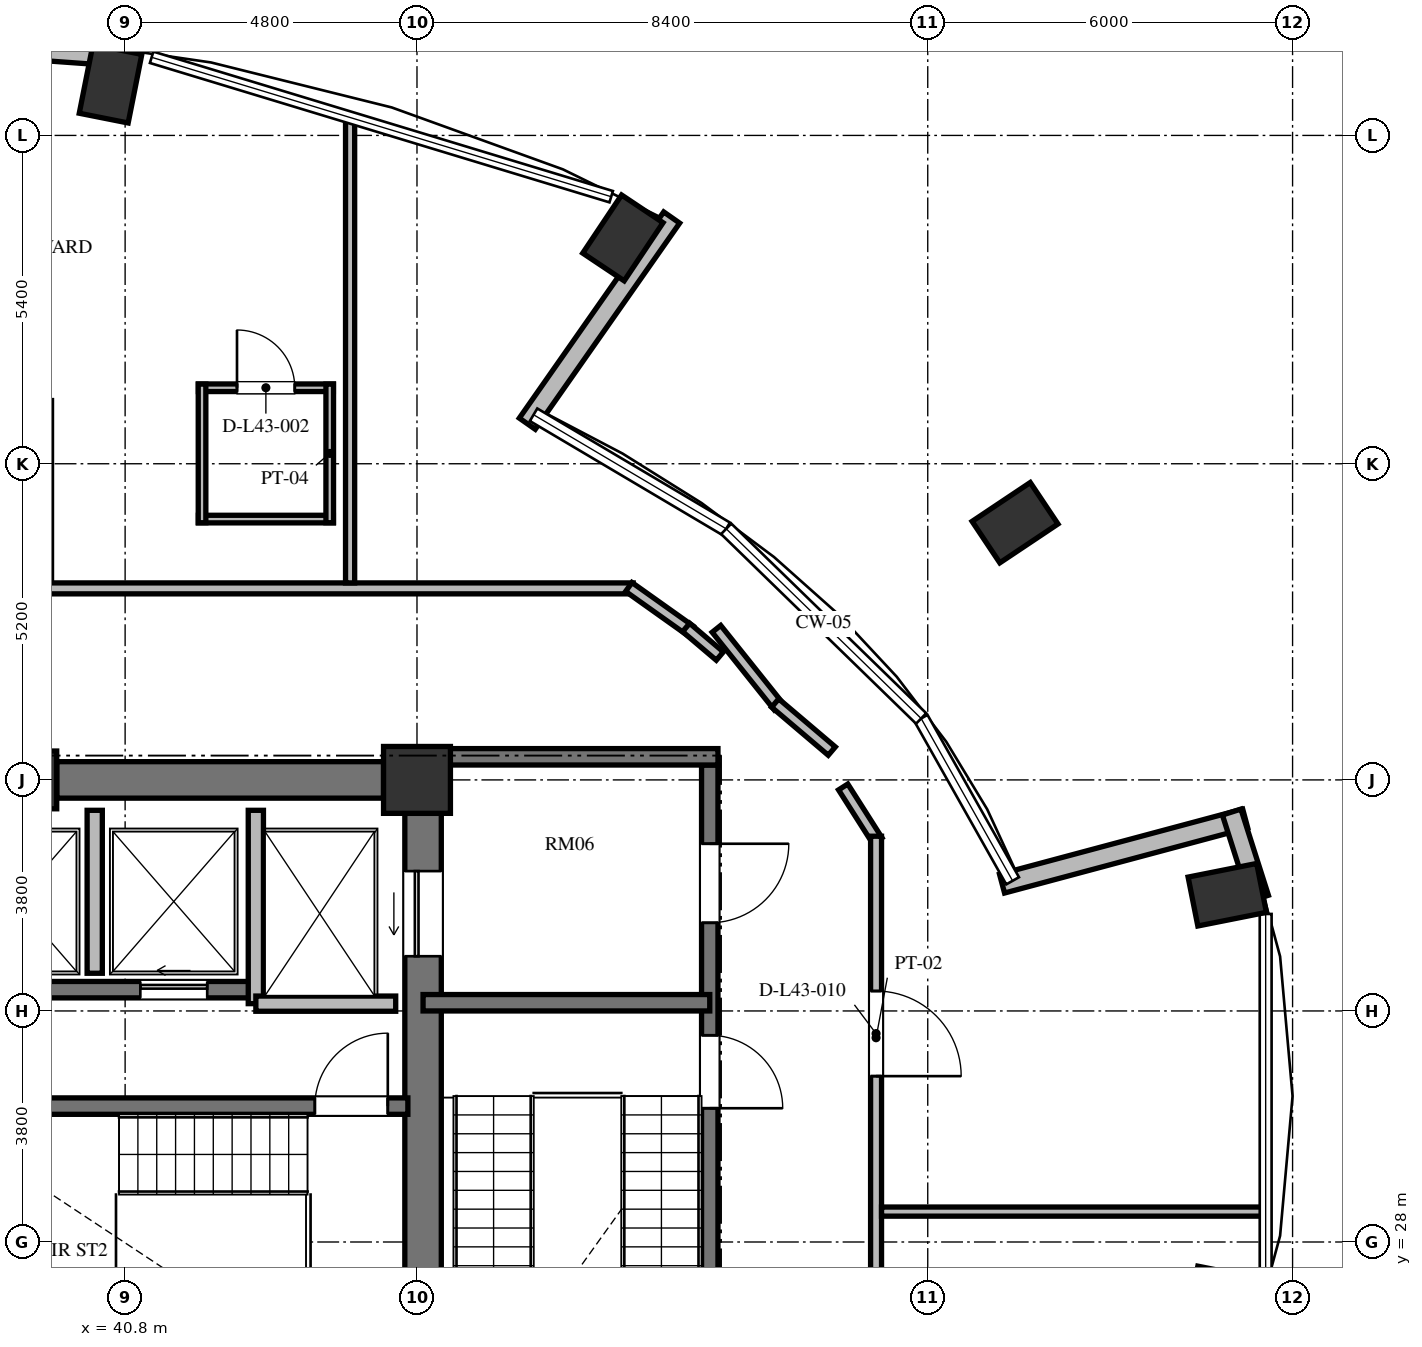
"""IFC4 building model, lengths in metres.
Left out: names, types, materials, properties, quantities, classifications, styles, units other than length and angle.
Written with IfcOpenShell. Run it as: python <this file> out.ifc"""

import sys

from ifc_helpers import new_model, si_unit, direction, frame, frame_2d, origin, origin_2d, place, context, subcontext, project, spatial, rectangle, extrude, element, fill, save


model = new_model("IFC4")
c1 = context("Model", 3, precision=1e-05, world=origin(), true_north=direction((0.0, 1.0)))
c2 = subcontext(c1, "Body", "Model", "MODEL_VIEW")
j1 = project(units=[si_unit("LENGTHUNIT", "METRE"), si_unit("PLANEANGLEUNIT", "RADIAN")], contexts=[c1])
p1 = place(None, origin())
s1 = spatial("IfcSite", under=j1, at=p1, CompositionType="ELEMENT")
p2 = place(p1, origin())
s2 = spatial("IfcBuilding", under=s1, at=p2, CompositionType="ELEMENT")
p3 = place(p2, frame((0.0, 0.0, 167.472)))
s3 = spatial("IfcBuildingStorey", under=s2, at=p3, CompositionType="ELEMENT", Elevation=167.472)
for number, where, z_axis, x_axis in (
    (1, (58.926, 27.088, 0.0), (0.0, 0.0, 1.0), (0.981, -0.195, 0.0)),
    (2, (58.926, 33.712, 0.0), (0.0, 0.0, 1.0), (0.981, 0.195, 0.0)),
    (3, (55.436, 39.831, 0.0), (0.0, 0.0, 1.0), (0.831, 0.556, 0.0)),
    (4, (48.987, 44.514, 0.0), (0.0, 0.0, 1.0), (0.556, 0.831, 0.0)),
    (5, (40.56, 47.049, 0.0), (0.0, 0.0, 1.0), (0.195, 0.981, 0.0)),
):
    element("IfcColumn", number, at=place(p3, frame(where, z_axis=z_axis, x_axis=x_axis)), inside=s3, PredefinedType="COLUMN", context=c2, shape_type="SweptSolid", body=[
        extrude(rectangle(XDim=1.15, YDim=0.82, at=origin_2d()), origin(), (0.0, 0.0, 1.0), 3.648),
    ])
p4 = place(p3, frame((45.6, 35.6, 0.0), z_axis=(0.0, 0.0, 1.0), x_axis=(1.0, 0.0, 0.0)))
e6 = element("IfcColumn", 6, at=p4, inside=s3, PredefinedType="COLUMN", context=c2, shape_type="SweptSolid", body=[
    extrude(rectangle(XDim=1.1, YDim=1.1, at=origin_2d()), origin(), (0.0, 0.0, 1.0), 3.648),
])
p5 = place(p3, frame((39.2, 35.6, 0.0), z_axis=(0.0, 0.0, 1.0), x_axis=(1.0, 0.0, 0.0)))
e7 = element("IfcColumn", 7, at=p5, inside=s3, PredefinedType="COLUMN", context=c2, shape_type="SweptSolid", body=[
    extrude(rectangle(XDim=0.95, YDim=0.95, at=origin_2d()), origin(), (0.0, 0.0, 1.0), 3.648),
])
p6 = place(p3, frame((45.7, 20.95, 0.0), z_axis=(0.0, 0.0, 1.0), x_axis=(0.0, 1.0, 0.0)))
e8 = element("IfcWall", 8, at=p6, inside=s3, PredefinedType="SHEAR", context=c2, shape_type="SweptSolid", body=[
    extrude(rectangle(XDim=14.1, YDim=0.6, at=frame_2d((7.05, 0.0))), origin(), (0.0, 0.0, 1.0), 3.648),
])
p7 = place(p6, frame((11.75, 0.0, 0.0)))
e9 = element("IfcOpeningElement", 9, at=p7, cuts=e8, PredefinedType="OPENING", context=c2, shape_type="SweptSolid", body=[
    extrude(rectangle(XDim=1.4, YDim=2.3, at=frame_2d((0.7, 1.15))), frame((0.0, 0.31, 0.0), z_axis=(0.0, -1.0, 0.0), x_axis=(1.0, 0.0, 0.0)), (0.0, 0.0, 1.0), 0.62),
])
p8 = place(p6, frame((0.95, 0.0, 0.0)))
e10 = element("IfcOpeningElement", 10, at=p8, cuts=e8, PredefinedType="OPENING", context=c2, shape_type="SweptSolid", body=[
    extrude(rectangle(XDim=1.4, YDim=2.3, at=frame_2d((0.7, 1.15))), frame((0.0, 0.31, 0.0), z_axis=(0.0, -1.0, 0.0), x_axis=(1.0, 0.0, 0.0)), (0.0, 0.0, 1.0), 0.62),
])
p9 = place(p3, frame((39.675, 35.6, 0.0), z_axis=(0.0, 0.0, 1.0), x_axis=(1.0, 0.0, 0.0)))
e11 = element("IfcWall", 11, at=p9, inside=s3, PredefinedType="SHEAR", context=c2, shape_type="SweptSolid", body=[
    extrude(rectangle(XDim=5.375, YDim=0.6, at=frame_2d((2.688, 0.0))), origin(), (0.0, 0.0, 1.0), 3.648),
])
p10 = place(p3, frame((40.701, 47.501, 0.0), z_axis=(0.0, 0.0, 1.0), x_axis=(-0.997415460462, 0.071849838072, 0.0)))
e12 = element("IfcWall", 12, at=p10, inside=s3, PredefinedType="SOLIDWALL", context=c2, shape_type="SweptSolid", body=[
    extrude(rectangle(XDim=4.893, YDim=0.32, at=frame_2d((2.447, 0.0))), origin(), (0.0, 0.0, 1.0), 3.428),
])
p11 = place(p10, frame((1.846, 0.0, 0.85)))
e13 = element("IfcOpeningElement", 13, at=p11, cuts=e12, PredefinedType="OPENING", context=c2, shape_type="SweptSolid", body=[
    extrude(rectangle(XDim=1.2, YDim=2.2, at=frame_2d((0.6, 1.1))), frame((0.0, 0.17, 0.0), z_axis=(0.0, -1.0, 0.0), x_axis=(1.0, 0.0, 0.0)), (0.0, 0.0, 1.0), 0.34),
])
p12 = place(p3, frame((59.221, 34.966, 0.0), z_axis=(0.0, 0.0, 1.0), x_axis=(-0.965925940868, -0.258818617489, 0.0)))
e14 = element("IfcWall", 14, at=p12, inside=s3, PredefinedType="SOLIDWALL", context=c2, shape_type="SweptSolid", body=[
    extrude(rectangle(XDim=4.14, YDim=0.32, at=frame_2d((2.07, 0.0))), origin(), (0.0, 0.0, 1.0), 3.428),
])
p13 = place(p3, frame((49.789, 44.85, 0.0), z_axis=(0.0, 0.0, 1.0), x_axis=(-0.57355337011, -0.819168194961, 0.0)))
e15 = element("IfcWall", 15, at=p13, inside=s3, PredefinedType="SOLIDWALL", context=c2, shape_type="SweptSolid", body=[
    extrude(rectangle(XDim=4.14, YDim=0.32, at=frame_2d((2.07, 0.0))), origin(), (0.0, 0.0, 1.0), 3.428),
])
p14 = place(p3, frame((59.45, 33.654, 0.0), z_axis=(0.0, 0.0, 1.0), x_axis=(-0.303745470451, 0.952753215256, 0.0)))
e16 = element("IfcWall", 16, at=p14, inside=s3, PredefinedType="SOLIDWALL", context=c2, shape_type="SweptSolid", body=[
    extrude(rectangle(XDim=1.488, YDim=0.32, at=frame_2d((0.744, 0.0))), origin(), (0.0, 0.0, 1.0), 3.428),
])
p15 = place(p3, frame((37.465, 30.235, 0.0), z_axis=(0.0, 0.0, 1.0), x_axis=(1.0, 0.0, 0.0)))
e17 = element("IfcWall", 17, at=p15, inside=s3, PredefinedType="SHEAR", context=c2, shape_type="SweptSolid", body=[
    extrude(rectangle(XDim=7.985, YDim=0.27, at=frame_2d((3.992, 0.0))), origin(), (0.0, 0.0, 1.0), 3.648),
])
p16 = place(p15, frame((6.455, 0.0, 0.0)))
e18 = element("IfcOpeningElement", 18, at=p16, cuts=e17, PredefinedType="OPENING", context=c2, shape_type="SweptSolid", body=[
    extrude(rectangle(XDim=1.2, YDim=2.15, at=frame_2d((0.6, 1.075))), frame((0.0, 0.145, 0.0), z_axis=(0.0, -1.0, 0.0), x_axis=(1.0, 0.0, 0.0)), (0.0, 0.0, 1.0), 0.29),
])
p17 = place(p3, frame((26.55, 32.15, 0.0), z_axis=(0.0, 0.0, 1.0), x_axis=(1.0, 0.0, 0.0)))
e19 = element("IfcWall", 19, at=p17, inside=s3, PredefinedType="SHEAR", context=c2, shape_type="SweptSolid", body=[
    extrude(rectangle(XDim=16.4, YDim=0.27, at=frame_2d((8.2, 0.0))), origin(), (0.0, 0.0, 1.0), 3.648),
])
p18 = place(p17, frame((2.425, 0.0, 0.0)))
e20 = element("IfcOpeningElement", 20, at=p18, cuts=e19, PredefinedType="OPENING", context=c2, shape_type="SweptSolid", body=[
    extrude(rectangle(XDim=1.05, YDim=2.15, at=frame_2d((0.525, 1.075))), frame((0.0, 0.145, 0.0), z_axis=(0.0, -1.0, 0.0), x_axis=(1.0, 0.0, 0.0)), (0.0, 0.0, 1.0), 0.29),
])
p19 = place(p17, frame((6.5, 0.0, 0.0)))
e21 = element("IfcOpeningElement", 21, at=p19, cuts=e19, PredefinedType="OPENING", context=c2, shape_type="SweptSolid", body=[
    extrude(rectangle(XDim=1.1, YDim=2.2, at=frame_2d((0.55, 1.1))), frame((0.0, 0.145, 0.0), z_axis=(0.0, -1.0, 0.0), x_axis=(1.0, 0.0, 0.0)), (0.0, 0.0, 1.0), 0.29),
])
p20 = place(p17, frame((9.1, 0.0, 0.0)))
e22 = element("IfcOpeningElement", 22, at=p20, cuts=e19, PredefinedType="OPENING", context=c2, shape_type="SweptSolid", body=[
    extrude(rectangle(XDim=1.1, YDim=2.2, at=frame_2d((0.55, 1.1))), frame((0.0, 0.145, 0.0), z_axis=(0.0, -1.0, 0.0), x_axis=(1.0, 0.0, 0.0)), (0.0, 0.0, 1.0), 0.29),
])
p21 = place(p17, frame((11.9, 0.0, 0.0)))
e23 = element("IfcOpeningElement", 23, at=p21, cuts=e19, PredefinedType="OPENING", context=c2, shape_type="SweptSolid", body=[
    extrude(rectangle(XDim=1.1, YDim=2.2, at=frame_2d((0.55, 1.1))), frame((0.0, 0.145, 0.0), z_axis=(0.0, -1.0, 0.0), x_axis=(1.0, 0.0, 0.0)), (0.0, 0.0, 1.0), 0.29),
])
p22 = place(p17, frame((14.5, 0.0, 0.0)))
e24 = element("IfcOpeningElement", 24, at=p22, cuts=e19, PredefinedType="OPENING", context=c2, shape_type="SweptSolid", body=[
    extrude(rectangle(XDim=1.1, YDim=2.2, at=frame_2d((0.55, 1.1))), frame((0.0, 0.145, 0.0), z_axis=(0.0, -1.0, 0.0), x_axis=(1.0, 0.0, 0.0)), (0.0, 0.0, 1.0), 0.29),
])
p23 = place(p3, frame((42.95, 31.92, 0.0), z_axis=(0.0, 0.0, 1.0), x_axis=(0.0, 1.0, 0.0)))
e25 = element("IfcWall", 25, at=p23, inside=s3, PredefinedType="SOLIDWALL", context=c2, shape_type="SweptSolid", body=[
    extrude(rectangle(XDim=3.18, YDim=0.25, at=frame_2d((1.59, 0.0))), origin(), (0.0, 0.0, 1.0), 3.428),
])
p24 = place(p3, frame((42.95, 31.92, 0.0), z_axis=(0.0, 0.0, 1.0), x_axis=(1.0, 0.0, 0.0)))
e26 = element("IfcWall", 26, at=p24, inside=s3, PredefinedType="SOLIDWALL", context=c2, shape_type="SweptSolid", body=[
    extrude(rectangle(XDim=2.3, YDim=0.25, at=frame_2d((1.15, 0.0))), origin(), (0.0, 0.0, 1.0), 3.428),
])
p25 = place(p3, frame((40.3, 32.42, 0.0), z_axis=(0.0, 0.0, 1.0), x_axis=(0.0, 1.0, 0.0)))
e27 = element("IfcWall", 27, at=p25, inside=s3, PredefinedType="SOLIDWALL", context=c2, shape_type="SweptSolid", body=[
    extrude(rectangle(XDim=2.68, YDim=0.25, at=frame_2d((1.34, 0.0))), origin(), (0.0, 0.0, 1.0), 3.428),
])
p26 = place(p3, frame((50.415, 35.845, 0.0), z_axis=(0.0, 0.0, 1.0), x_axis=(0.0, -1.0, 0.0)))
e28 = element("IfcWall", 28, at=p26, inside=s3, PredefinedType="SHEAR", context=c2, shape_type="SweptSolid", body=[
    extrude(rectangle(XDim=15.825, YDim=0.27, at=frame_2d((7.913, 0.0))), origin(), (0.0, 0.0, 1.0), 3.648),
])
p27 = place(p26, frame((4.445, 0.0, 0.0)))
e29 = element("IfcOpeningElement", 29, at=p27, cuts=e28, PredefinedType="OPENING", context=c2, shape_type="SweptSolid", body=[
    extrude(rectangle(XDim=1.2, YDim=2.15, at=frame_2d((0.6, 1.075))), frame((0.0, 0.145, 0.0), z_axis=(0.0, -1.0, 0.0), x_axis=(1.0, 0.0, 0.0)), (0.0, 0.0, 1.0), 0.29),
])
p28 = place(p26, frame((1.295, 0.0, 0.0)))
e30 = element("IfcOpeningElement", 30, at=p28, cuts=e28, PredefinedType="OPENING", context=c2, shape_type="SweptSolid", body=[
    extrude(rectangle(XDim=1.3, YDim=2.2, at=frame_2d((0.65, 1.1))), frame((0.0, 0.145, 0.0), z_axis=(0.0, -1.0, 0.0), x_axis=(1.0, 0.0, 0.0)), (0.0, 0.0, 1.0), 0.29),
])
p29 = place(p26, frame((13.095, 0.0, 0.0)))
e31 = element("IfcOpeningElement", 31, at=p29, cuts=e28, PredefinedType="OPENING", context=c2, shape_type="SweptSolid", body=[
    extrude(rectangle(XDim=1.3, YDim=2.2, at=frame_2d((0.65, 1.1))), frame((0.0, 0.145, 0.0), z_axis=(0.0, -1.0, 0.0), x_axis=(1.0, 0.0, 0.0)), (0.0, 0.0, 1.0), 0.29),
])
p30 = place(p3, frame((46.0, 35.98, 0.0), z_axis=(0.0, 0.0, 1.0), x_axis=(1.0, 0.0, 0.0)))
e32 = element("IfcWall", 32, at=p30, inside=s3, PredefinedType="SHEAR", context=c2, shape_type="SweptSolid", body=[
    extrude(rectangle(XDim=4.55, YDim=0.27, at=frame_2d((2.275, 0.0))), origin(), (0.0, 0.0, 1.0), 3.648),
])
p31 = place(p3, frame((45.7, 31.935, 0.0), z_axis=(0.0, 0.0, 1.0), x_axis=(1.0, 0.0, 0.0)))
e33 = element("IfcWall", 33, at=p31, inside=s3, PredefinedType="SHEAR", context=c2, shape_type="SweptSolid", body=[
    extrude(rectangle(XDim=4.715, YDim=0.27, at=frame_2d((2.357, 0.0))), origin(), (0.0, 0.0, 1.0), 3.648),
])
p32 = place(p3, frame((39.46, 38.75, 0.0), z_axis=(0.0, 0.0, 1.0), x_axis=(1.0, 0.0, 0.0)))
e34 = element("IfcWall", 34, at=p32, inside=s3, PredefinedType="PARTITIONING", context=c2, shape_type="SweptSolid", body=[
    extrude(rectangle(XDim=9.696, YDim=0.18, at=frame_2d((4.848, 0.0))), origin(), (0.0, 0.0, 1.0), 3.428),
])
p33 = place(p3, frame((49.083, 38.773, 0.0), z_axis=(0.0, 0.0, 1.0), x_axis=(0.815094383649, -0.579328184835, 0.0)))
e35 = element("IfcWall", 35, at=p33, inside=s3, PredefinedType="PARTITIONING", context=c2, shape_type="SweptSolid", body=[
    extrude(rectangle(XDim=1.234, YDim=0.18, at=frame_2d((0.617, 0.0))), origin(), (0.0, 0.0, 1.0), 3.428),
])
p34 = place(p3, frame((50.026, 38.107, 0.0), z_axis=(0.0, 0.0, 1.0), x_axis=(0.762519178552, -0.646965611405, 0.0)))
e36 = element("IfcWall", 36, at=p34, inside=s3, PredefinedType="PARTITIONING", context=c2, shape_type="SweptSolid", body=[
    extrude(rectangle(XDim=0.727, YDim=0.18, at=frame_2d((0.363, 0.0))), origin(), (0.0, 0.0, 1.0), 3.428),
])
p35 = place(p3, frame((50.525, 38.085, 0.0), z_axis=(0.0, 0.0, 1.0), x_axis=(0.624367263629, -0.781130923794, 0.0)))
e37 = element("IfcWall", 37, at=p35, inside=s3, PredefinedType="PARTITIONING", context=c2, shape_type="SweptSolid", body=[
    extrude(rectangle(XDim=1.635, YDim=0.18, at=frame_2d((0.818, 0.0))), origin(), (0.0, 0.0, 1.0), 3.428),
])
p36 = place(p3, frame((51.49, 36.865, 0.0), z_axis=(0.0, 0.0, 1.0), x_axis=(0.762506147444, -0.646980969666, 0.0)))
e38 = element("IfcWall", 38, at=p36, inside=s3, PredefinedType="PARTITIONING", context=c2, shape_type="SweptSolid", body=[
    extrude(rectangle(XDim=1.221, YDim=0.18, at=frame_2d((0.611, 0.0))), origin(), (0.0, 0.0, 1.0), 3.428),
])
p37 = place(p3, frame((52.609, 35.484, 0.0), z_axis=(0.0, 0.0, 1.0), x_axis=(0.536664379082, -0.843795795335, 0.0)))
e39 = element("IfcWall", 39, at=p37, inside=s3, PredefinedType="PARTITIONING", context=c2, shape_type="SweptSolid", body=[
    extrude(rectangle(XDim=1.048, YDim=0.18, at=frame_2d((0.524, 0.0))), origin(), (0.0, 0.0, 1.0), 3.428),
])
p38 = place(p3, frame((53.15, 34.674, 0.0), z_axis=(0.0, 0.0, 1.0), x_axis=(0.0, -1.0, 0.0)))
e40 = element("IfcWall", 40, at=p38, inside=s3, PredefinedType="PARTITIONING", context=c2, shape_type="SweptSolid", body=[
    extrude(rectangle(XDim=13.258, YDim=0.18, at=frame_2d((6.629, 0.0))), origin(), (0.0, 0.0, 1.0), 3.428),
])
p39 = place(p38, frame((8.857, 0.0, 0.0)))
e41 = element("IfcOpeningElement", 41, at=p39, cuts=e40, PredefinedType="OPENING", context=c2, shape_type="SweptSolid", body=[
    extrude(rectangle(XDim=1.4, YDim=2.2, at=frame_2d((0.7, 1.1))), frame((0.0, 0.1, 0.0), z_axis=(0.0, -1.0, 0.0), x_axis=(1.0, 0.0, 0.0)), (0.0, 0.0, 1.0), 0.2),
])
p40 = place(p38, frame((2.546, 0.0, 0.0)))
e42 = element("IfcOpeningElement", 42, at=p40, cuts=e40, PredefinedType="OPENING", context=c2, shape_type="SweptSolid", body=[
    extrude(rectangle(XDim=1.4, YDim=2.2, at=frame_2d((0.7, 1.1))), frame((0.0, 0.1, 0.0), z_axis=(0.0, -1.0, 0.0), x_axis=(1.0, 0.0, 0.0)), (0.0, 0.0, 1.0), 0.2),
])
p41 = place(p3, frame((53.24, 28.5, 0.0), z_axis=(0.0, 0.0, 1.0), x_axis=(1.0, 0.0, 0.0)))
e43 = element("IfcWall", 43, at=p41, inside=s3, PredefinedType="PARTITIONING", context=c2, shape_type="SweptSolid", body=[
    extrude(rectangle(XDim=6.307, YDim=0.15, at=frame_2d((3.154, 0.0))), origin(), (0.0, 0.0, 1.0), 3.428),
])
p42 = place(p3, frame((44.5, 38.84, 0.0), z_axis=(0.0, 0.0, 1.0), x_axis=(0.0, 1.0, 0.0)))
e44 = element("IfcWall", 44, at=p42, inside=s3, PredefinedType="PARTITIONING", context=c2, shape_type="SweptSolid", body=[
    extrude(rectangle(XDim=7.639, YDim=0.15, at=frame_2d((3.82, 0.0))), origin(), (0.0, 0.0, 1.0), 3.428),
])
p43 = place(p3, frame((42.005, 42.05, 0.0), z_axis=(0.0, 0.0, 1.0), x_axis=(1.0, 0.0, 0.0)))
e45 = element("IfcWall", 45, at=p43, inside=s3, PredefinedType="PARTITIONING", context=c2, shape_type="SweptSolid", body=[
    extrude(rectangle(XDim=2.22, YDim=0.125, at=frame_2d((1.11, 0.0))), origin(), (0.0, 0.0, 1.0), 3.428),
])
p44 = place(p43, frame((0.635, 0.0, 0.0)))
e46 = element("IfcOpeningElement", 46, at=p44, cuts=e45, PredefinedType="OPENING", context=c2, shape_type="SweptSolid", body=[
    extrude(rectangle(XDim=0.95, YDim=2.1, at=frame_2d((0.475, 1.05))), frame((0.0, 0.073, 0.0), z_axis=(0.0, -1.0, 0.0), x_axis=(1.0, 0.0, 0.0)), (0.0, 0.0, 1.0), 0.145),
])
p45 = place(p3, frame((42.005, 39.89, 0.0), z_axis=(0.0, 0.0, 1.0), x_axis=(1.0, 0.0, 0.0)))
e47 = element("IfcWall", 47, at=p45, inside=s3, PredefinedType="PARTITIONING", context=c2, shape_type="SweptSolid", body=[
    extrude(rectangle(XDim=2.22, YDim=0.125, at=frame_2d((1.11, 0.0))), origin(), (0.0, 0.0, 1.0), 3.428),
])
for number, where, z_axis, x_axis in (
    (48, (44.165, 39.83, 0.0), (0.0, 0.0, 1.0), (0.0, 1.0, 0.0)),
    (49, (42.065, 39.83, 0.0), (0.0, 0.0, 1.0), (0.0, 1.0, 0.0)),
):
    element("IfcWall", number, at=place(p3, frame(where, z_axis=z_axis, x_axis=x_axis)), inside=s3, PredefinedType="PARTITIONING", context=c2, shape_type="SweptSolid", body=[
        extrude(rectangle(XDim=2.28, YDim=0.125, at=frame_2d((1.14, 0.0))), origin(), (0.0, 0.0, 1.0), 3.428),
    ])
p46 = place(p16, origin())
e50 = element("IfcDoor", 50, at=p46, inside=s3, OperationType="SINGLE_SWING_RIGHT", PredefinedType="DOOR", context=c2, shape_type="SweptSolid", body=[
    extrude(rectangle(XDim=1.2, YDim=2.15, at=frame_2d((0.6, 1.075))), frame((0.0, 0.025, 0.0), z_axis=(0.0, -1.0, 0.0), x_axis=(1.0, 0.0, 0.0)), (0.0, 0.0, 1.0), 0.05),
])
fill(e18, e50)
p47 = place(p22, origin())
e51 = element("IfcDoor", 51, at=p47, inside=s3, OperationType="SLIDING_TO_LEFT", PredefinedType="DOOR", context=c2, shape_type="SweptSolid", body=[
    extrude(rectangle(XDim=1.1, YDim=2.2, at=frame_2d((0.55, 1.1))), frame((0.0, 0.025, 0.0), z_axis=(0.0, -1.0, 0.0), x_axis=(1.0, 0.0, 0.0)), (0.0, 0.0, 1.0), 0.05),
])
fill(e24, e51)
p48 = place(p7, origin())
e52 = element("IfcDoor", 52, at=p48, inside=s3, OperationType="SLIDING_TO_LEFT", PredefinedType="DOOR", context=c2, shape_type="SweptSolid", body=[
    extrude(rectangle(XDim=1.4, YDim=2.3, at=frame_2d((0.7, 1.15))), frame((0.0, 0.025, 0.0), z_axis=(0.0, -1.0, 0.0), x_axis=(1.0, 0.0, 0.0)), (0.0, 0.0, 1.0), 0.05),
])
fill(e9, e52)
p49 = place(p27, origin())
e53 = element("IfcDoor", 53, at=p49, inside=s3, OperationType="SINGLE_SWING_RIGHT", PredefinedType="DOOR", context=c2, shape_type="SweptSolid", body=[
    extrude(rectangle(XDim=1.2, YDim=2.15, at=frame_2d((0.6, 1.075))), frame((0.0, 0.025, 0.0), z_axis=(0.0, -1.0, 0.0), x_axis=(1.0, 0.0, 0.0)), (0.0, 0.0, 1.0), 0.05),
])
fill(e29, e53)
p50 = place(p28, origin())
e54 = element("IfcDoor", 54, at=p50, inside=s3, OperationType="SINGLE_SWING_LEFT", PredefinedType="DOOR", context=c2, shape_type="SweptSolid", body=[
    extrude(rectangle(XDim=1.3, YDim=2.2, at=frame_2d((0.65, 1.1))), frame((0.0, 0.025, 0.0), z_axis=(0.0, -1.0, 0.0), x_axis=(1.0, 0.0, 0.0)), (0.0, 0.0, 1.0), 0.05),
])
fill(e30, e54)
p51 = place(p40, origin())
e55 = element("IfcDoor", 55, at=p51, inside=s3, OperationType="SINGLE_SWING_RIGHT", PredefinedType="DOOR", context=c2, shape_type="SweptSolid", body=[
    extrude(rectangle(XDim=1.4, YDim=2.2, at=frame_2d((0.7, 1.1))), frame((0.0, 0.025, 0.0), z_axis=(0.0, -1.0, 0.0), x_axis=(1.0, 0.0, 0.0)), (0.0, 0.0, 1.0), 0.05),
])
fill(e42, e55)
p52 = place(p44, origin())
e56 = element("IfcDoor", 56, at=p52, inside=s3, OperationType="SINGLE_SWING_LEFT", PredefinedType="DOOR", context=c2, shape_type="SweptSolid", body=[
    extrude(rectangle(XDim=0.95, YDim=2.1, at=frame_2d((0.475, 1.05))), frame((0.0, 0.025, 0.0), z_axis=(0.0, -1.0, 0.0), x_axis=(1.0, 0.0, 0.0)), (0.0, 0.0, 1.0), 0.05),
])
fill(e46, e56)
save(model, sys.argv[1])
